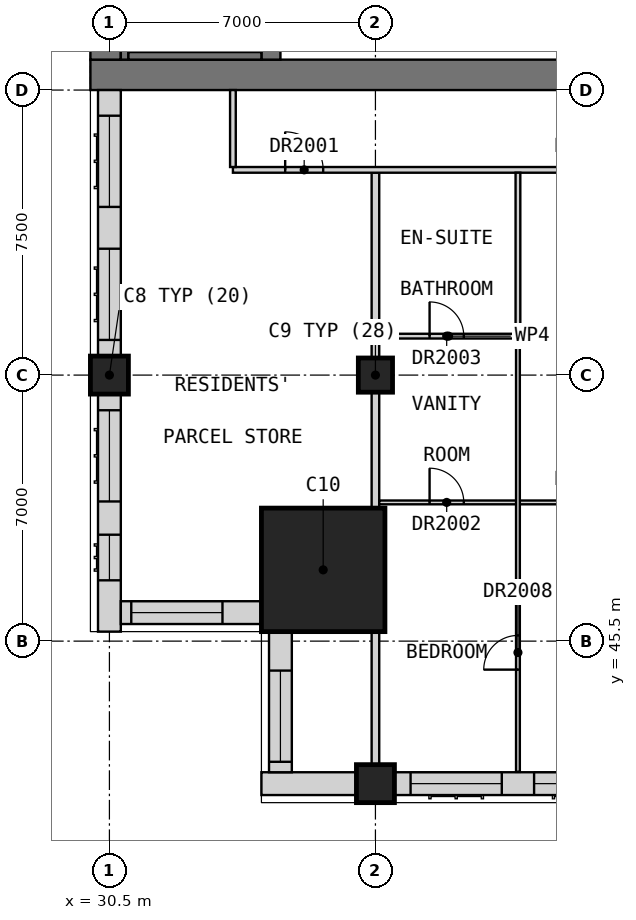
"""IFC4 building model, lengths in metres.
Left out: names, types, materials, properties, quantities, classifications, styles, units other than length and angle.
Written with IfcOpenShell. Run it as: python <this file> out.ifc"""

import sys

from ifc_helpers import new_model, si_unit, direction, frame, frame_2d, origin, origin_2d, place, context, subcontext, project, spatial, rectangle, extrude, element, fill, save


model = new_model("IFC4")
c1 = context("Model", 3, precision=1e-05, world=origin(), true_north=direction((0.0, 1.0)))
c2 = subcontext(c1, "Body", "Model", "MODEL_VIEW")
j1 = project(units=[si_unit("LENGTHUNIT", "METRE"), si_unit("PLANEANGLEUNIT", "RADIAN")], contexts=[c1])
p1 = place(None, origin())
s1 = spatial("IfcSite", under=j1, at=p1, CompositionType="ELEMENT")
p2 = place(p1, origin())
s2 = spatial("IfcBuilding", under=s1, at=p2, CompositionType="ELEMENT")
p3 = place(p2, frame((0.0, 0.0, 210.7)))
s3 = spatial("IfcBuildingStorey", under=s2, at=p3, CompositionType="ELEMENT", Elevation=210.7)
for number, where, z_axis, x_axis in (
    (1, (37.5, 41.75, 0.0), (0.0, 0.0, 1.0), (1.0, 0.0, 0.0)),
    (2, (30.5, 52.5, 0.0), (0.0, 0.0, 1.0), (1.0, 0.0, 0.0)),
):
    element("IfcColumn", number, at=place(p3, frame(where, z_axis=z_axis, x_axis=x_axis)), inside=s3, PredefinedType="COLUMN", context=c2, shape_type="SweptSolid", body=[
        extrude(rectangle(XDim=1.0, YDim=1.0, at=origin_2d()), origin(), (0.0, 0.0, 1.0), 3.5),
    ])
p4 = place(p3, frame((37.5, 52.5, 0.0), z_axis=(0.0, 0.0, 1.0), x_axis=(1.0, 0.0, 0.0)))
e3 = element("IfcColumn", 3, at=p4, inside=s3, PredefinedType="COLUMN", context=c2, shape_type="SweptSolid", body=[
    extrude(rectangle(XDim=0.9, YDim=0.9, at=origin_2d()), origin(), (0.0, 0.0, 1.0), 3.5),
])
p5 = place(p3, frame((36.125, 47.375, 0.0), z_axis=(0.0, 0.0, 1.0), x_axis=(1.0, 0.0, 0.0)))
e4 = element("IfcColumn", 4, at=p5, inside=s3, PredefinedType="COLUMN", context=c2, shape_type="SweptSolid", body=[
    extrude(rectangle(XDim=3.25, YDim=3.25, at=origin_2d()), origin(), (0.0, 0.0, 1.0), 3.5),
])
p6 = place(p3, frame((30.0, 60.4, 0.0), z_axis=(0.0, 0.0, 1.0), x_axis=(1.0, 0.0, 0.0)))
e5 = element("IfcWall", 5, at=p6, inside=s3, PredefinedType="SHEAR", context=c2, shape_type="SweptSolid", body=[
    extrude(rectangle(XDim=30.0, YDim=0.8, at=frame_2d((15.0, 0.0))), origin(), (0.0, 0.0, 1.0), 3.5),
])
p7 = place(p6, frame((21.9, 0.0, 0.0)))
e6 = element("IfcOpeningElement", 6, at=p7, cuts=e5, PredefinedType="OPENING", context=c2, shape_type="SweptSolid", body=[
    extrude(rectangle(XDim=1.8, YDim=2.1, at=frame_2d((0.9, 1.05))), frame((0.0, 0.41, 0.0), z_axis=(0.0, -1.0, 0.0), x_axis=(1.0, 0.0, 0.0)), (0.0, 0.0, 1.0), 0.82),
])
p8 = place(p6, frame((26.5, 0.0, 0.0)))
e7 = element("IfcOpeningElement", 7, at=p8, cuts=e5, PredefinedType="OPENING", context=c2, shape_type="SweptSolid", body=[
    extrude(rectangle(XDim=1.2, YDim=2.1, at=frame_2d((0.6, 1.05))), frame((0.0, 0.41, 0.0), z_axis=(0.0, -1.0, 0.0), x_axis=(1.0, 0.0, 0.0)), (0.0, 0.0, 1.0), 0.82),
])
p9 = place(p3, frame((30.4, 60.8, 0.0), z_axis=(0.0, 0.0, 1.0), x_axis=(0.0, 1.0, 0.0)))
e8 = element("IfcWall", 8, at=p9, inside=s3, PredefinedType="SHEAR", context=c2, shape_type="SweptSolid", body=[
    extrude(rectangle(XDim=20.9, YDim=0.8, at=frame_2d((10.45, 0.0))), origin(), (0.0, 0.0, 1.0), 3.5),
])
p10 = place(p3, frame((34.75, 60.8, 0.0), z_axis=(0.0, 0.0, 1.0), x_axis=(0.0, 1.0, 0.0)))
e9 = element("IfcWall", 9, at=p10, inside=s3, PredefinedType="SHEAR", context=c2, shape_type="SweptSolid", body=[
    extrude(rectangle(XDim=3.4, YDim=0.5, at=frame_2d((1.7, 0.0))), origin(), (0.0, 0.0, 1.0), 3.5),
])
p11 = place(p3, frame((34.5, 41.75, 0.0), z_axis=(0.0, 0.0, 1.0), x_axis=(1.0, 0.0, 0.0)))
e10 = element("IfcWall", 10, at=p11, inside=s3, PredefinedType="SOLIDWALL", context=c2, shape_type="SweptSolid", body=[
    extrude(rectangle(XDim=2.5, YDim=0.6, at=frame_2d((1.25, 0.0))), origin(), (0.0, 0.0, 1.0), 3.1),
])
p12 = place(p3, frame((38.0, 41.75, 0.0), z_axis=(0.0, 0.0, 1.0), x_axis=(1.0, 0.0, 0.0)))
e11 = element("IfcWall", 11, at=p12, inside=s3, PredefinedType="SOLIDWALL", context=c2, shape_type="SweptSolid", body=[
    extrude(rectangle(XDim=6.5, YDim=0.6, at=frame_2d((3.25, 0.0))), origin(), (0.0, 0.0, 1.0), 2.75),
])
p13 = place(p12, frame((0.425, 0.0, 0.8)))
e12 = element("IfcOpeningElement", 12, at=p13, cuts=e11, PredefinedType="OPENING", context=c2, shape_type="SweptSolid", body=[
    extrude(rectangle(XDim=2.4, YDim=1.8, at=frame_2d((1.2, 0.9))), frame((0.0, 0.31, 0.0), z_axis=(0.0, -1.0, 0.0), x_axis=(1.0, 0.0, 0.0)), (0.0, 0.0, 1.0), 0.62),
])
p14 = place(p12, frame((3.675, 0.0, 0.8)))
e13 = element("IfcOpeningElement", 13, at=p14, cuts=e11, PredefinedType="OPENING", context=c2, shape_type="SweptSolid", body=[
    extrude(rectangle(XDim=2.4, YDim=1.8, at=frame_2d((1.2, 0.9))), frame((0.0, 0.31, 0.0), z_axis=(0.0, -1.0, 0.0), x_axis=(1.0, 0.0, 0.0)), (0.0, 0.0, 1.0), 0.62),
])
p15 = place(p3, frame((30.5, 60.0, 0.0), z_axis=(0.0, 0.0, 1.0), x_axis=(0.0, -1.0, 0.0)))
e14 = element("IfcWall", 14, at=p15, inside=s3, PredefinedType="SOLIDWALL", context=c2, shape_type="SweptSolid", body=[
    extrude(rectangle(XDim=7.0, YDim=0.6, at=frame_2d((3.5, 0.0))), origin(), (0.0, 0.0, 1.0), 3.1),
])
p16 = place(p15, frame((4.175, 0.0, 0.8)))
e15 = element("IfcOpeningElement", 15, at=p16, cuts=e14, PredefinedType="OPENING", context=c2, shape_type="SweptSolid", body=[
    extrude(rectangle(XDim=2.4, YDim=1.8, at=frame_2d((1.2, 0.9))), frame((0.0, 0.31, 0.0), z_axis=(0.0, -1.0, 0.0), x_axis=(1.0, 0.0, 0.0)), (0.0, 0.0, 1.0), 0.62),
])
p17 = place(p15, frame((0.675, 0.0, 0.8)))
e16 = element("IfcOpeningElement", 16, at=p17, cuts=e14, PredefinedType="OPENING", context=c2, shape_type="SweptSolid", body=[
    extrude(rectangle(XDim=2.4, YDim=1.8, at=frame_2d((1.2, 0.9))), frame((0.0, 0.31, 0.0), z_axis=(0.0, -1.0, 0.0), x_axis=(1.0, 0.0, 0.0)), (0.0, 0.0, 1.0), 0.62),
])
p18 = place(p3, frame((30.5, 52.0, 0.0), z_axis=(0.0, 0.0, 1.0), x_axis=(0.0, -1.0, 0.0)))
e17 = element("IfcWall", 17, at=p18, inside=s3, PredefinedType="SOLIDWALL", context=c2, shape_type="SweptSolid", body=[
    extrude(rectangle(XDim=6.25, YDim=0.6, at=frame_2d((3.125, 0.0))), origin(), (0.0, 0.0, 1.0), 2.75),
])
p19 = place(p18, frame((3.7, 0.0, 0.8)))
e18 = element("IfcOpeningElement", 18, at=p19, cuts=e17, PredefinedType="OPENING", context=c2, shape_type="SweptSolid", body=[
    extrude(rectangle(XDim=1.2, YDim=1.8, at=frame_2d((0.6, 0.9))), frame((0.0, 0.31, 0.0), z_axis=(0.0, -1.0, 0.0), x_axis=(1.0, 0.0, 0.0)), (0.0, 0.0, 1.0), 0.62),
])
p20 = place(p18, frame((0.425, 0.0, 0.8)))
e19 = element("IfcOpeningElement", 19, at=p20, cuts=e17, PredefinedType="OPENING", context=c2, shape_type="SweptSolid", body=[
    extrude(rectangle(XDim=2.4, YDim=1.8, at=frame_2d((1.2, 0.9))), frame((0.0, 0.31, 0.0), z_axis=(0.0, -1.0, 0.0), x_axis=(1.0, 0.0, 0.0)), (0.0, 0.0, 1.0), 0.62),
])
p21 = place(p3, frame((30.8, 46.25, 0.0), z_axis=(0.0, 0.0, 1.0), x_axis=(1.0, 0.0, 0.0)))
e20 = element("IfcWall", 20, at=p21, inside=s3, PredefinedType="SOLIDWALL", context=c2, shape_type="SweptSolid", body=[
    extrude(rectangle(XDim=3.7, YDim=0.6, at=frame_2d((1.85, 0.0))), origin(), (0.0, 0.0, 1.0), 3.1),
])
p22 = place(p21, frame((0.275, 0.0, 0.8)))
e21 = element("IfcOpeningElement", 21, at=p22, cuts=e20, PredefinedType="OPENING", context=c2, shape_type="SweptSolid", body=[
    extrude(rectangle(XDim=2.4, YDim=1.8, at=frame_2d((1.2, 0.9))), frame((0.0, 0.31, 0.0), z_axis=(0.0, -1.0, 0.0), x_axis=(1.0, 0.0, 0.0)), (0.0, 0.0, 1.0), 0.62),
])
p23 = place(p3, frame((35.0, 45.75, 0.0), z_axis=(0.0, 0.0, 1.0), x_axis=(0.0, -1.0, 0.0)))
e22 = element("IfcWall", 22, at=p23, inside=s3, PredefinedType="SOLIDWALL", context=c2, shape_type="SweptSolid", body=[
    extrude(rectangle(XDim=3.7, YDim=0.6, at=frame_2d((1.85, 0.0))), origin(), (0.0, 0.0, 1.0), 3.1),
])
p24 = place(p23, frame((1.025, 0.0, 0.8)))
e23 = element("IfcOpeningElement", 23, at=p24, cuts=e22, PredefinedType="OPENING", context=c2, shape_type="SweptSolid", body=[
    extrude(rectangle(XDim=2.4, YDim=1.8, at=frame_2d((1.2, 0.9))), frame((0.0, 0.31, 0.0), z_axis=(0.0, -1.0, 0.0), x_axis=(1.0, 0.0, 0.0)), (0.0, 0.0, 1.0), 0.62),
])
p25 = place(p3, frame((30.9, 60.8, 0.0), z_axis=(0.0, 0.0, 1.0), x_axis=(0.0, 1.0, 0.0)))
e24 = element("IfcWall", 24, at=p25, inside=s3, PredefinedType="SOLIDWALL", context=c2, shape_type="SweptSolid", body=[
    extrude(rectangle(XDim=20.9, YDim=0.2, at=frame_2d((10.45, 0.0))), origin(), (0.0, 0.0, 1.0), 3.09),
])
p26 = place(p3, frame((31.0, 60.9, 0.0), z_axis=(0.0, 0.0, 1.0), x_axis=(1.0, 0.0, 0.0)))
e25 = element("IfcWall", 25, at=p26, inside=s3, PredefinedType="SOLIDWALL", context=c2, shape_type="SweptSolid", body=[
    extrude(rectangle(XDim=3.5, YDim=0.2, at=frame_2d((1.75, 0.0))), origin(), (0.0, 0.0, 1.0), 3.09),
])
p27 = place(p3, frame((37.5, 41.25, 0.0), z_axis=(0.0, 0.0, 1.0), x_axis=(0.0, 1.0, 0.0)))
e26 = element("IfcWall", 26, at=p27, inside=s3, PredefinedType="PARTITIONING", context=c2, shape_type="SweptSolid", body=[
    extrude(rectangle(XDim=16.575, YDim=0.2, at=frame_2d((8.288, 0.0))), origin(), (0.0, 0.0, 1.0), 2.75),
])
p28 = place(p3, frame((33.75, 57.9, 0.0), z_axis=(0.0, 0.0, 1.0), x_axis=(1.0, 0.0, 0.0)))
e27 = element("IfcWall", 27, at=p28, inside=s3, PredefinedType="PARTITIONING", context=c2, shape_type="SweptSolid", body=[
    extrude(rectangle(XDim=28.35, YDim=0.15, at=frame_2d((14.175, 0.0))), origin(), (0.0, 0.0, 1.0), 3.1),
])
p29 = place(p28, frame((1.375, 0.0, 0.0)))
e28 = element("IfcOpeningElement", 28, at=p29, cuts=e27, PredefinedType="OPENING", context=c2, shape_type="SweptSolid", body=[
    extrude(rectangle(XDim=1.0, YDim=2.1, at=frame_2d((0.5, 1.05))), frame((0.0, 0.085, 0.0), z_axis=(0.0, -1.0, 0.0), x_axis=(1.0, 0.0, 0.0)), (0.0, 0.0, 1.0), 0.17),
])
p30 = place(p28, frame((8.925, 0.0, 0.0)))
e29 = element("IfcOpeningElement", 29, at=p30, cuts=e27, PredefinedType="OPENING", context=c2, shape_type="SweptSolid", body=[
    extrude(rectangle(XDim=0.9, YDim=2.1, at=frame_2d((0.45, 1.05))), frame((0.0, 0.085, 0.0), z_axis=(0.0, -1.0, 0.0), x_axis=(1.0, 0.0, 0.0)), (0.0, 0.0, 1.0), 0.17),
])
p31 = place(p28, frame((20.175, 0.0, 0.0)))
e30 = element("IfcOpeningElement", 30, at=p31, cuts=e27, PredefinedType="OPENING", context=c2, shape_type="SweptSolid", body=[
    extrude(rectangle(XDim=0.9, YDim=2.1, at=frame_2d((0.45, 1.05))), frame((0.0, 0.085, 0.0), z_axis=(0.0, -1.0, 0.0), x_axis=(1.0, 0.0, 0.0)), (0.0, 0.0, 1.0), 0.17),
])
p32 = place(p28, frame((26.8, 0.0, 0.0)))
e31 = element("IfcOpeningElement", 31, at=p32, cuts=e27, PredefinedType="OPENING", context=c2, shape_type="SweptSolid", body=[
    extrude(rectangle(XDim=1.0, YDim=2.1, at=frame_2d((0.5, 1.05))), frame((0.0, 0.085, 0.0), z_axis=(0.0, -1.0, 0.0), x_axis=(1.0, 0.0, 0.0)), (0.0, 0.0, 1.0), 0.17),
])
p33 = place(p3, frame((33.75, 57.975, 0.0), z_axis=(0.0, 0.0, 1.0), x_axis=(0.0, 1.0, 0.0)))
e32 = element("IfcWall", 32, at=p33, inside=s3, PredefinedType="PARTITIONING", context=c2, shape_type="SweptSolid", body=[
    extrude(rectangle(XDim=2.025, YDim=0.15, at=frame_2d((1.012, 0.0))), origin(), (0.0, 0.0, 1.0), 3.1),
])
p34 = place(p3, frame((37.6, 49.15, 0.0), z_axis=(0.0, 0.0, 1.0), x_axis=(1.0, 0.0, 0.0)))
e33 = element("IfcWall", 33, at=p34, inside=s3, PredefinedType="PARTITIONING", context=c2, shape_type="SweptSolid", body=[
    extrude(rectangle(XDim=22.3, YDim=0.1, at=frame_2d((11.15, 0.0))), origin(), (0.0, 0.0, 1.0), 3.1),
])
p35 = place(p34, frame((1.325, 0.0, 0.0)))
e34 = element("IfcOpeningElement", 34, at=p35, cuts=e33, PredefinedType="OPENING", context=c2, shape_type="SweptSolid", body=[
    extrude(rectangle(XDim=0.9, YDim=2.1, at=frame_2d((0.45, 1.05))), frame((0.0, 0.06, 0.0), z_axis=(0.0, -1.0, 0.0), x_axis=(1.0, 0.0, 0.0)), (0.0, 0.0, 1.0), 0.12),
])
p36 = place(p34, frame((5.075, 0.0, 0.0)))
e35 = element("IfcOpeningElement", 35, at=p36, cuts=e33, PredefinedType="OPENING", context=c2, shape_type="SweptSolid", body=[
    extrude(rectangle(XDim=0.9, YDim=2.1, at=frame_2d((0.45, 1.05))), frame((0.0, 0.06, 0.0), z_axis=(0.0, -1.0, 0.0), x_axis=(1.0, 0.0, 0.0)), (0.0, 0.0, 1.0), 0.12),
])
p37 = place(p34, frame((12.575, 0.0, 0.0)))
e36 = element("IfcOpeningElement", 36, at=p37, cuts=e33, PredefinedType="OPENING", context=c2, shape_type="SweptSolid", body=[
    extrude(rectangle(XDim=0.9, YDim=2.1, at=frame_2d((0.45, 1.05))), frame((0.0, 0.06, 0.0), z_axis=(0.0, -1.0, 0.0), x_axis=(1.0, 0.0, 0.0)), (0.0, 0.0, 1.0), 0.12),
])
p38 = place(p34, frame((16.325, 0.0, 0.0)))
e37 = element("IfcOpeningElement", 37, at=p38, cuts=e33, PredefinedType="OPENING", context=c2, shape_type="SweptSolid", body=[
    extrude(rectangle(XDim=0.9, YDim=2.1, at=frame_2d((0.45, 1.05))), frame((0.0, 0.06, 0.0), z_axis=(0.0, -1.0, 0.0), x_axis=(1.0, 0.0, 0.0)), (0.0, 0.0, 1.0), 0.12),
])
p39 = place(p3, frame((41.25, 42.06, 0.0), z_axis=(0.0, 0.0, 1.0), x_axis=(0.0, 1.0, 0.0)))
e38 = element("IfcWall", 38, at=p39, inside=s3, PredefinedType="PARTITIONING", context=c2, shape_type="SweptSolid", body=[
    extrude(rectangle(XDim=11.402, YDim=0.1, at=frame_2d((5.701, 0.0))), origin(), (0.0, 0.0, 1.0), 3.1),
])
p40 = place(p39, frame((2.69, 0.0, 0.0)))
e39 = element("IfcOpeningElement", 39, at=p40, cuts=e38, PredefinedType="OPENING", context=c2, shape_type="SweptSolid", body=[
    extrude(rectangle(XDim=0.9, YDim=2.1, at=frame_2d((0.45, 1.05))), frame((0.0, 0.06, 0.0), z_axis=(0.0, -1.0, 0.0), x_axis=(1.0, 0.0, 0.0)), (0.0, 0.0, 1.0), 0.12),
])
p41 = place(p3, frame((37.6, 53.525, 0.0), z_axis=(0.0, 0.0, 1.0), x_axis=(1.0, 0.0, 0.0)))
e40 = element("IfcWall", 40, at=p41, inside=s3, PredefinedType="PARTITIONING", context=c2, shape_type="SweptSolid", body=[
    extrude(rectangle(XDim=3.65, YDim=0.125, at=frame_2d((1.825, 0.0))), origin(), (0.0, 0.0, 1.0), 3.1),
])
p42 = place(p41, frame((1.325, 0.0, 0.0)))
e41 = element("IfcOpeningElement", 41, at=p42, cuts=e40, PredefinedType="OPENING", context=c2, shape_type="SweptSolid", body=[
    extrude(rectangle(XDim=0.9, YDim=2.1, at=frame_2d((0.45, 1.05))), frame((0.0, 0.073, 0.0), z_axis=(0.0, -1.0, 0.0), x_axis=(1.0, 0.0, 0.0)), (0.0, 0.0, 1.0), 0.145),
])
p43 = place(p3, frame((41.25, 53.587, 0.0), z_axis=(0.0, 0.0, 1.0), x_axis=(0.0, 1.0, 0.0)))
e42 = element("IfcWall", 42, at=p43, inside=s3, PredefinedType="PARTITIONING", context=c2, shape_type="SweptSolid", body=[
    extrude(rectangle(XDim=4.238, YDim=0.125, at=frame_2d((2.119, 0.0))), origin(), (0.0, 0.0, 1.0), 3.1),
])
p44 = place(p13, origin())
e43 = element("IfcWindow", 43, at=p44, inside=s3, PartitioningType="SINGLE_PANEL", PredefinedType="WINDOW", context=c2, shape_type="SweptSolid", body=[
    extrude(rectangle(XDim=2.4, YDim=1.8, at=frame_2d((1.2, 0.9))), frame((0.0, -0.07, 0.0), z_axis=(0.0, -1.0, 0.0), x_axis=(1.0, 0.0, 0.0)), (0.0, 0.0, 1.0), 0.06),
])
fill(e12, e43)
p45 = place(p14, origin())
e44 = element("IfcWindow", 44, at=p45, inside=s3, PartitioningType="SINGLE_PANEL", PredefinedType="WINDOW", context=c2, shape_type="SweptSolid", body=[
    extrude(rectangle(XDim=2.4, YDim=1.8, at=frame_2d((1.2, 0.9))), frame((0.0, -0.07, 0.0), z_axis=(0.0, -1.0, 0.0), x_axis=(1.0, 0.0, 0.0)), (0.0, 0.0, 1.0), 0.06),
])
fill(e13, e44)
p46 = place(p16, origin())
e45 = element("IfcWindow", 45, at=p46, inside=s3, PartitioningType="SINGLE_PANEL", PredefinedType="WINDOW", context=c2, shape_type="SweptSolid", body=[
    extrude(rectangle(XDim=2.4, YDim=1.8, at=frame_2d((1.2, 0.9))), frame((0.0, -0.07, 0.0), z_axis=(0.0, -1.0, 0.0), x_axis=(1.0, 0.0, 0.0)), (0.0, 0.0, 1.0), 0.06),
])
fill(e15, e45)
p47 = place(p17, origin())
e46 = element("IfcWindow", 46, at=p47, inside=s3, PartitioningType="SINGLE_PANEL", PredefinedType="WINDOW", context=c2, shape_type="SweptSolid", body=[
    extrude(rectangle(XDim=2.4, YDim=1.8, at=frame_2d((1.2, 0.9))), frame((0.0, -0.07, 0.0), z_axis=(0.0, -1.0, 0.0), x_axis=(1.0, 0.0, 0.0)), (0.0, 0.0, 1.0), 0.06),
])
fill(e16, e46)
p48 = place(p19, origin())
e47 = element("IfcWindow", 47, at=p48, inside=s3, PartitioningType="SINGLE_PANEL", PredefinedType="WINDOW", context=c2, shape_type="SweptSolid", body=[
    extrude(rectangle(XDim=1.2, YDim=1.8, at=frame_2d((0.6, 0.9))), frame((0.0, -0.07, 0.0), z_axis=(0.0, -1.0, 0.0), x_axis=(1.0, 0.0, 0.0)), (0.0, 0.0, 1.0), 0.06),
])
fill(e18, e47)
p49 = place(p20, origin())
e48 = element("IfcWindow", 48, at=p49, inside=s3, PartitioningType="SINGLE_PANEL", PredefinedType="WINDOW", context=c2, shape_type="SweptSolid", body=[
    extrude(rectangle(XDim=2.4, YDim=1.8, at=frame_2d((1.2, 0.9))), frame((0.0, -0.07, 0.0), z_axis=(0.0, -1.0, 0.0), x_axis=(1.0, 0.0, 0.0)), (0.0, 0.0, 1.0), 0.06),
])
fill(e19, e48)
p50 = place(p22, origin())
e49 = element("IfcWindow", 49, at=p50, inside=s3, PartitioningType="SINGLE_PANEL", PredefinedType="WINDOW", context=c2, shape_type="SweptSolid", body=[
    extrude(rectangle(XDim=2.4, YDim=1.8, at=frame_2d((1.2, 0.9))), frame((0.0, -0.07, 0.0), z_axis=(0.0, -1.0, 0.0), x_axis=(1.0, 0.0, 0.0)), (0.0, 0.0, 1.0), 0.06),
])
fill(e21, e49)
p51 = place(p24, origin())
e50 = element("IfcWindow", 50, at=p51, inside=s3, PartitioningType="SINGLE_PANEL", PredefinedType="WINDOW", context=c2, shape_type="SweptSolid", body=[
    extrude(rectangle(XDim=2.4, YDim=1.8, at=frame_2d((1.2, 0.9))), frame((0.0, -0.07, 0.0), z_axis=(0.0, -1.0, 0.0), x_axis=(1.0, 0.0, 0.0)), (0.0, 0.0, 1.0), 0.06),
])
fill(e23, e50)
p52 = place(p29, origin())
e51 = element("IfcDoor", 51, at=p52, inside=s3, OperationType="SINGLE_SWING_RIGHT", PredefinedType="DOOR", context=c2, shape_type="SweptSolid", body=[
    extrude(rectangle(XDim=1.0, YDim=2.1, at=frame_2d((0.5, 1.05))), frame((0.0, 0.025, 0.0), z_axis=(0.0, -1.0, 0.0), x_axis=(1.0, 0.0, 0.0)), (0.0, 0.0, 1.0), 0.05),
])
fill(e28, e51)
p53 = place(p35, origin())
e52 = element("IfcDoor", 52, at=p53, inside=s3, OperationType="SINGLE_SWING_LEFT", PredefinedType="DOOR", context=c2, shape_type="SweptSolid", body=[
    extrude(rectangle(XDim=0.9, YDim=2.1, at=frame_2d((0.45, 1.05))), frame((0.0, 0.025, 0.0), z_axis=(0.0, -1.0, 0.0), x_axis=(1.0, 0.0, 0.0)), (0.0, 0.0, 1.0), 0.05),
])
fill(e34, e52)
p54 = place(p42, origin())
e53 = element("IfcDoor", 53, at=p54, inside=s3, OperationType="SINGLE_SWING_LEFT", PredefinedType="DOOR", context=c2, shape_type="SweptSolid", body=[
    extrude(rectangle(XDim=0.9, YDim=2.1, at=frame_2d((0.45, 1.05))), frame((0.0, 0.025, 0.0), z_axis=(0.0, -1.0, 0.0), x_axis=(1.0, 0.0, 0.0)), (0.0, 0.0, 1.0), 0.05),
])
fill(e41, e53)
p55 = place(p40, origin())
e54 = element("IfcDoor", 54, at=p55, inside=s3, OperationType="SINGLE_SWING_LEFT", PredefinedType="DOOR", context=c2, shape_type="SweptSolid", body=[
    extrude(rectangle(XDim=0.9, YDim=2.1, at=frame_2d((0.45, 1.05))), frame((0.0, 0.025, 0.0), z_axis=(0.0, -1.0, 0.0), x_axis=(1.0, 0.0, 0.0)), (0.0, 0.0, 1.0), 0.05),
])
fill(e39, e54)
save(model, sys.argv[1])
